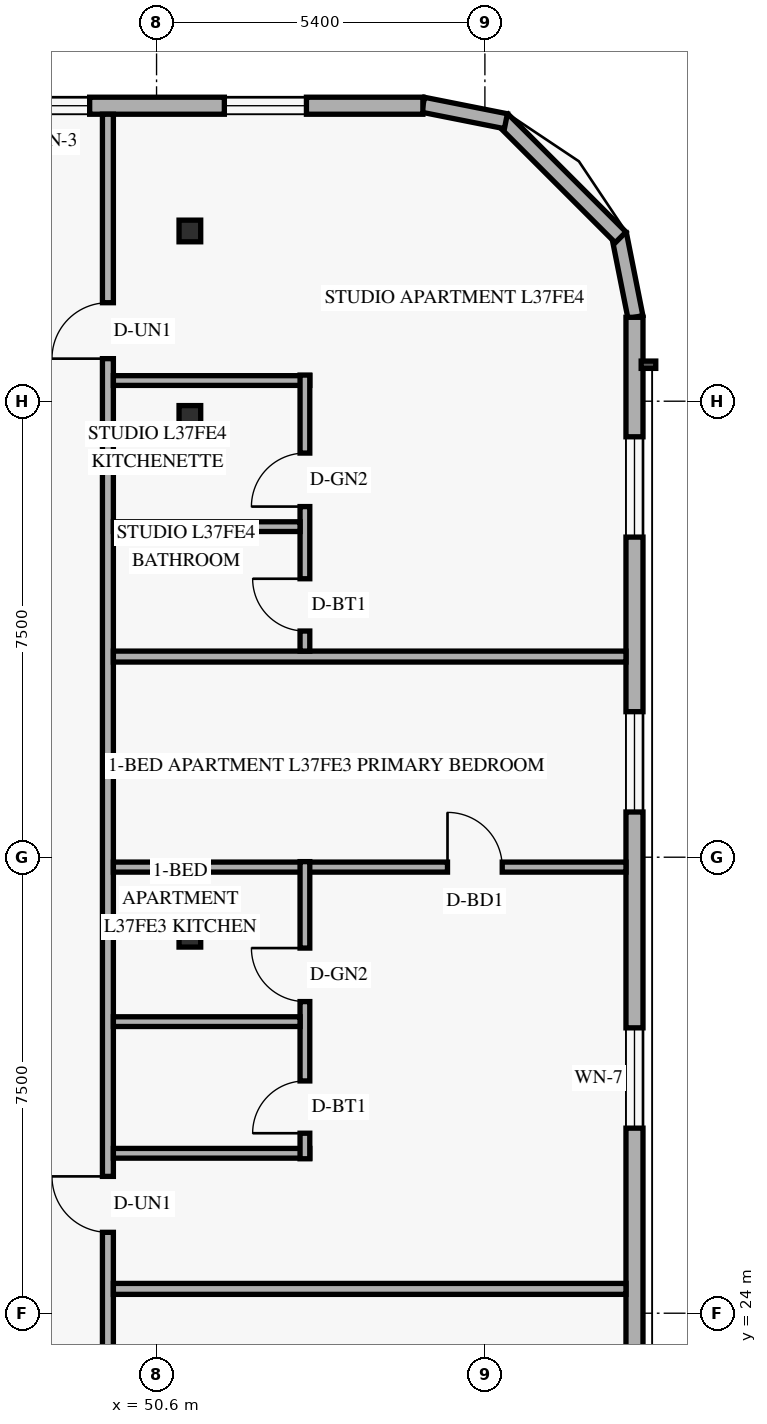
"""IFC4 building model, lengths in metres.
Left out: names, types, materials, properties, quantities, classifications, styles, units other than length and angle.
Written with IfcOpenShell. Run it as: python <this file> out.ifc"""

import sys

from ifc_helpers import new_model, si_unit, direction, frame, frame_2d, origin, origin_2d, place, context, subcontext, project, spatial, rectangle, hollow_rectangle, extrude, element, fill, save


model = new_model("IFC4")
c1 = context("Model", 3, precision=1e-05, world=origin(), true_north=direction((0.0, 1.0)))
c2 = subcontext(c1, "Body", "Model", "MODEL_VIEW")
j1 = project(units=[si_unit("LENGTHUNIT", "METRE"), si_unit("PLANEANGLEUNIT", "RADIAN")], contexts=[c1])
p1 = place(None, origin())
s1 = spatial("IfcSite", under=j1, at=p1, CompositionType="ELEMENT")
p2 = place(p1, origin())
s2 = spatial("IfcBuilding", under=s1, at=p2, CompositionType="ELEMENT")
p3 = place(p2, frame((0.0, 0.0, 144.6)))
s3 = spatial("IfcBuildingStorey", under=s2, at=p3, CompositionType="ELEMENT", Elevation=144.6)
for number, where, z_axis, x_axis in (
    (1, (51.044, 30.2, 0.0), (0.058, 0.0, 0.998), (0.0, 1.0, 0.0)),
    (2, (51.044, 38.75, 0.0), (0.058, 0.0, 0.998), (0.0, 1.0, 0.0)),
    (3, (51.044, 41.8, 0.0), (0.058, 0.0, 0.998), (0.0, 1.0, 0.0)),
):
    element("IfcColumn", number, at=place(p3, frame(where, z_axis=z_axis, x_axis=x_axis)), inside=s3, PredefinedType="COLUMN", context=c2, shape_type="SweptSolid", body=[
        extrude(hollow_rectangle(XDim=0.356, YDim=0.356, WallThickness=0.016, at=origin_2d()), origin(), (0.0, 0.0, 1.0), 3.606),
    ])
p4 = place(p3, frame((58.476, 40.384, 0.0), z_axis=(0.0, 0.0, 1.0), x_axis=(-0.19496651342, 0.980809899341, 0.0)))
e4 = element("IfcWall", 4, at=p4, inside=s3, PredefinedType="SOLIDWALL", context=c2, shape_type="SweptSolid", body=[
    extrude(rectangle(XDim=1.389, YDim=0.25, at=frame_2d((0.694, 0.0))), origin(), (0.0, 0.0, 1.0), 3.36),
])
p5 = place(p3, frame((58.232, 41.695, 0.0), z_axis=(0.0, 0.0, 1.0), x_axis=(-0.707106781187, 0.707106781187, 0.0)))
e5 = element("IfcWall", 5, at=p5, inside=s3, PredefinedType="SOLIDWALL", context=c2, shape_type="SweptSolid", body=[
    extrude(rectangle(XDim=2.739, YDim=0.25, at=frame_2d((1.37, 0.0))), origin(), (0.0, 0.0, 1.0), 3.36),
])
p6 = place(p3, frame((56.345, 43.605, 0.0), z_axis=(0.0, 0.0, 1.0), x_axis=(-0.980809899341, 0.19496651342, 0.0)))
e6 = element("IfcWall", 6, at=p6, inside=s3, PredefinedType="SOLIDWALL", context=c2, shape_type="SweptSolid", body=[
    extrude(rectangle(XDim=1.389, YDim=0.25, at=frame_2d((0.694, 0.0))), origin(), (0.0, 0.0, 1.0), 3.36),
])
p7 = place(p3, frame((58.46, 7.62, 0.0), z_axis=(0.0, 0.0, 1.0), x_axis=(0.0, 1.0, 0.0)))
e7 = element("IfcWall", 7, at=p7, inside=s3, PredefinedType="SOLIDWALL", context=c2, shape_type="SweptSolid", body=[
    extrude(rectangle(XDim=32.76, YDim=0.28, at=frame_2d((16.38, 0.0))), origin(), (0.0, 0.0, 1.0), 3.36),
])
p8 = place(p7, frame((2.165, 0.0, 0.85)))
e8 = element("IfcOpeningElement", 8, at=p8, cuts=e7, PredefinedType="OPENING", context=c2, shape_type="SweptSolid", body=[
    extrude(rectangle(XDim=1.65, YDim=1.6, at=frame_2d((0.825, 0.8))), frame((0.0, 0.15, 0.0), z_axis=(0.0, -1.0, 0.0), x_axis=(1.0, 0.0, 0.0)), (0.0, 0.0, 1.0), 0.3),
])
p9 = place(p7, frame((8.1, 0.0, 0.85)))
e9 = element("IfcOpeningElement", 9, at=p9, cuts=e7, PredefinedType="OPENING", context=c2, shape_type="SweptSolid", body=[
    extrude(rectangle(XDim=1.65, YDim=1.6, at=frame_2d((0.825, 0.8))), frame((0.0, 0.15, 0.0), z_axis=(0.0, -1.0, 0.0), x_axis=(1.0, 0.0, 0.0)), (0.0, 0.0, 1.0), 0.3),
])
p10 = place(p7, frame((13.5, 0.0, 0.85)))
e10 = element("IfcOpeningElement", 10, at=p10, cuts=e7, PredefinedType="OPENING", context=c2, shape_type="SweptSolid", body=[
    extrude(rectangle(XDim=1.65, YDim=1.6, at=frame_2d((0.825, 0.8))), frame((0.0, 0.15, 0.0), z_axis=(0.0, -1.0, 0.0), x_axis=(1.0, 0.0, 0.0)), (0.0, 0.0, 1.0), 0.3),
])
p11 = place(p7, frame((19.424, 0.0, 0.85)))
e11 = element("IfcOpeningElement", 11, at=p11, cuts=e7, PredefinedType="OPENING", context=c2, shape_type="SweptSolid", body=[
    extrude(rectangle(XDim=1.65, YDim=1.6, at=frame_2d((0.825, 0.8))), frame((0.0, 0.15, 0.0), z_axis=(0.0, -1.0, 0.0), x_axis=(1.0, 0.0, 0.0)), (0.0, 0.0, 1.0), 0.3),
])
p12 = place(p7, frame((24.624, 0.0, 0.85)))
e12 = element("IfcOpeningElement", 12, at=p12, cuts=e7, PredefinedType="OPENING", context=c2, shape_type="SweptSolid", body=[
    extrude(rectangle(XDim=1.65, YDim=1.6, at=frame_2d((0.825, 0.8))), frame((0.0, 0.15, 0.0), z_axis=(0.0, -1.0, 0.0), x_axis=(1.0, 0.0, 0.0)), (0.0, 0.0, 1.0), 0.3),
])
p13 = place(p7, frame((29.145, 0.0, 0.85)))
e13 = element("IfcOpeningElement", 13, at=p13, cuts=e7, PredefinedType="OPENING", context=c2, shape_type="SweptSolid", body=[
    extrude(rectangle(XDim=1.65, YDim=1.6, at=frame_2d((0.825, 0.8))), frame((0.0, 0.15, 0.0), z_axis=(0.0, -1.0, 0.0), x_axis=(1.0, 0.0, 0.0)), (0.0, 0.0, 1.0), 0.3),
])
p14 = place(p3, frame((54.98, 43.86, 0.0), z_axis=(0.0, 0.0, 1.0), x_axis=(-1.0, 0.0, 0.0)))
e14 = element("IfcWall", 14, at=p14, inside=s3, PredefinedType="SOLIDWALL", context=c2, shape_type="SweptSolid", body=[
    extrude(rectangle(XDim=33.76, YDim=0.28, at=frame_2d((16.88, 0.0))), origin(), (0.0, 0.0, 1.0), 3.36),
])
p15 = place(p14, frame((28.28, 0.0, 0.85)))
e15 = element("IfcOpeningElement", 15, at=p15, cuts=e14, PredefinedType="OPENING", context=c2, shape_type="SweptSolid", body=[
    extrude(rectangle(XDim=1.35, YDim=1.55, at=frame_2d((0.675, 0.775))), frame((0.0, 0.15, 0.0), z_axis=(0.0, -1.0, 0.0), x_axis=(1.0, 0.0, 0.0)), (0.0, 0.0, 1.0), 0.3),
])
p16 = place(p14, frame((21.395, 0.0, 0.85)))
e16 = element("IfcOpeningElement", 16, at=p16, cuts=e14, PredefinedType="OPENING", context=c2, shape_type="SweptSolid", body=[
    extrude(rectangle(XDim=1.35, YDim=1.55, at=frame_2d((0.675, 0.775))), frame((0.0, 0.15, 0.0), z_axis=(0.0, -1.0, 0.0), x_axis=(1.0, 0.0, 0.0)), (0.0, 0.0, 1.0), 0.3),
])
p17 = place(p14, frame((15.09, 0.0, 0.85)))
e17 = element("IfcOpeningElement", 17, at=p17, cuts=e14, PredefinedType="OPENING", context=c2, shape_type="SweptSolid", body=[
    extrude(rectangle(XDim=1.35, YDim=1.55, at=frame_2d((0.675, 0.775))), frame((0.0, 0.15, 0.0), z_axis=(0.0, -1.0, 0.0), x_axis=(1.0, 0.0, 0.0)), (0.0, 0.0, 1.0), 0.3),
])
p18 = place(p14, frame((8.8, 0.0, 0.85)))
e18 = element("IfcOpeningElement", 18, at=p18, cuts=e14, PredefinedType="OPENING", context=c2, shape_type="SweptSolid", body=[
    extrude(rectangle(XDim=1.35, YDim=1.55, at=frame_2d((0.675, 0.775))), frame((0.0, 0.15, 0.0), z_axis=(0.0, -1.0, 0.0), x_axis=(1.0, 0.0, 0.0)), (0.0, 0.0, 1.0), 0.3),
])
p19 = place(p14, frame((5.48, 0.0, 0.85)))
e19 = element("IfcOpeningElement", 19, at=p19, cuts=e14, PredefinedType="OPENING", context=c2, shape_type="SweptSolid", body=[
    extrude(rectangle(XDim=1.2, YDim=1.5, at=frame_2d((0.6, 0.75))), frame((0.0, 0.15, 0.0), z_axis=(0.0, -1.0, 0.0), x_axis=(1.0, 0.0, 0.0)), (0.0, 0.0, 1.0), 0.3),
])
p20 = place(p14, frame((1.915, 0.0, 0.85)))
e20 = element("IfcOpeningElement", 20, at=p20, cuts=e14, PredefinedType="OPENING", context=c2, shape_type="SweptSolid", body=[
    extrude(rectangle(XDim=1.35, YDim=1.55, at=frame_2d((0.675, 0.775))), frame((0.0, 0.15, 0.0), z_axis=(0.0, -1.0, 0.0), x_axis=(1.0, 0.0, 0.0)), (0.0, 0.0, 1.0), 0.3),
])
p21 = place(p3, frame((49.8, 4.28, 0.0), z_axis=(0.0, 0.0, 1.0), x_axis=(0.0, 1.0, 0.0)))
e21 = element("IfcWall", 21, at=p21, inside=s3, PredefinedType="STANDARD", context=c2, shape_type="SweptSolid", body=[
    extrude(rectangle(XDim=39.44, YDim=0.18, at=frame_2d((19.72, 0.0))), origin(), (0.0, 0.0, 1.0), 2.73),
])
p22 = place(p21, frame((3.38, 0.0, 0.0)))
e22 = element("IfcOpeningElement", 22, at=p22, cuts=e21, PredefinedType="OPENING", context=c2, shape_type="SweptSolid", body=[
    extrude(rectangle(XDim=0.92, YDim=2.15, at=frame_2d((0.46, 1.075))), frame((0.0, 0.1, 0.0), z_axis=(0.0, -1.0, 0.0), x_axis=(1.0, 0.0, 0.0)), (0.0, 0.0, 1.0), 0.2),
])
p23 = place(p21, frame((14.32, 0.0, 0.0)))
e23 = element("IfcOpeningElement", 23, at=p23, cuts=e21, PredefinedType="OPENING", context=c2, shape_type="SweptSolid", body=[
    extrude(rectangle(XDim=0.92, YDim=2.15, at=frame_2d((0.46, 1.075))), frame((0.0, 0.1, 0.0), z_axis=(0.0, -1.0, 0.0), x_axis=(1.0, 0.0, 0.0)), (0.0, 0.0, 1.0), 0.2),
])
p24 = place(p21, frame((21.05, 0.0, 0.0)))
e24 = element("IfcOpeningElement", 24, at=p24, cuts=e21, PredefinedType="OPENING", context=c2, shape_type="SweptSolid", body=[
    extrude(rectangle(XDim=0.92, YDim=2.15, at=frame_2d((0.46, 1.075))), frame((0.0, 0.1, 0.0), z_axis=(0.0, -1.0, 0.0), x_axis=(1.0, 0.0, 0.0)), (0.0, 0.0, 1.0), 0.2),
])
p25 = place(p21, frame((35.42, 0.0, 0.0)))
e25 = element("IfcOpeningElement", 25, at=p25, cuts=e21, PredefinedType="OPENING", context=c2, shape_type="SweptSolid", body=[
    extrude(rectangle(XDim=0.92, YDim=2.15, at=frame_2d((0.46, 1.075))), frame((0.0, 0.1, 0.0), z_axis=(0.0, -1.0, 0.0), x_axis=(1.0, 0.0, 0.0)), (0.0, 0.0, 1.0), 0.2),
])
p26 = place(p3, frame((49.89, 24.4, 0.0), z_axis=(0.0, 0.0, 1.0), x_axis=(1.0, 0.0, 0.0)))
e26 = element("IfcWall", 26, at=p26, inside=s3, PredefinedType="PARTITIONING", context=c2, shape_type="SweptSolid", body=[
    extrude(rectangle(XDim=8.43, YDim=0.18, at=frame_2d((4.215, 0.0))), origin(), (0.0, 0.0, 1.0), 2.879),
])
p27 = place(p3, frame((49.89, 31.337, 0.0), z_axis=(0.0, 0.0, 1.0), x_axis=(1.0, 0.0, 0.0)))
e27 = element("IfcWall", 27, at=p27, inside=s3, PredefinedType="PARTITIONING", context=c2, shape_type="SweptSolid", body=[
    extrude(rectangle(XDim=8.43, YDim=0.165, at=frame_2d((4.215, 0.0))), origin(), (0.0, 0.0, 1.0), 2.879),
])
p28 = place(p27, frame((5.495, 0.0, 0.0)))
e28 = element("IfcOpeningElement", 28, at=p28, cuts=e27, PredefinedType="OPENING", context=c2, shape_type="SweptSolid", body=[
    extrude(rectangle(XDim=0.9, YDim=2.14, at=frame_2d((0.45, 1.07))), frame((0.0, 0.093, 0.0), z_axis=(0.0, -1.0, 0.0), x_axis=(1.0, 0.0, 0.0)), (0.0, 0.0, 1.0), 0.185),
])
p29 = place(p3, frame((49.89, 26.63, 0.0), z_axis=(0.0, 0.0, 1.0), x_axis=(1.0, 0.0, 0.0)))
e29 = element("IfcWall", 29, at=p29, inside=s3, PredefinedType="PLUMBINGWALL", context=c2, shape_type="SweptSolid", body=[
    extrude(rectangle(XDim=3.23, YDim=0.16, at=frame_2d((1.615, 0.0))), origin(), (0.0, 0.0, 1.0), 2.879),
])
p30 = place(p3, frame((53.04, 26.54, 0.0), z_axis=(0.0, 0.0, 1.0), x_axis=(0.0, 1.0, 0.0)))
e30 = element("IfcWall", 30, at=p30, inside=s3, PredefinedType="PLUMBINGWALL", context=c2, shape_type="SweptSolid", body=[
    extrude(rectangle(XDim=4.887, YDim=0.16, at=frame_2d((2.444, 0.0))), origin(), (0.0, 0.0, 1.0), 3.36),
])
p31 = place(p30, frame((0.42, 0.0, 0.0)))
e31 = element("IfcOpeningElement", 31, at=p31, cuts=e30, PredefinedType="OPENING", context=c2, shape_type="SweptSolid", body=[
    extrude(rectangle(XDim=0.86, YDim=2.12, at=frame_2d((0.43, 1.06))), frame((0.0, 0.09, 0.0), z_axis=(0.0, -1.0, 0.0), x_axis=(1.0, 0.0, 0.0)), (0.0, 0.0, 1.0), 0.18),
])
p32 = place(p30, frame((2.585, 0.0, 0.0)))
e32 = element("IfcOpeningElement", 32, at=p32, cuts=e30, PredefinedType="OPENING", context=c2, shape_type="SweptSolid", body=[
    extrude(rectangle(XDim=0.88, YDim=2.12, at=frame_2d((0.44, 1.06))), frame((0.0, 0.09, 0.0), z_axis=(0.0, -1.0, 0.0), x_axis=(1.0, 0.0, 0.0)), (0.0, 0.0, 1.0), 0.18),
])
p33 = place(p3, frame((49.89, 28.796, 0.0), z_axis=(0.0, 0.0, 1.0), x_axis=(1.0, 0.0, 0.0)))
e33 = element("IfcWall", 33, at=p33, inside=s3, PredefinedType="PLUMBINGWALL", context=c2, shape_type="SweptSolid", body=[
    extrude(rectangle(XDim=3.07, YDim=0.16, at=frame_2d((1.535, 0.0))), origin(), (0.0, 0.0, 1.0), 2.879),
])
p34 = place(p3, frame((49.89, 34.8, 0.0), z_axis=(0.0, 0.0, 1.0), x_axis=(1.0, 0.0, 0.0)))
e34 = element("IfcWall", 34, at=p34, inside=s3, PredefinedType="PARTITIONING", context=c2, shape_type="SweptSolid", body=[
    extrude(rectangle(XDim=8.43, YDim=0.18, at=frame_2d((4.215, 0.0))), origin(), (0.0, 0.0, 1.0), 2.879),
])
p35 = place(p3, frame((49.89, 39.34, 0.0), z_axis=(0.0, 0.0, 1.0), x_axis=(1.0, 0.0, 0.0)))
e35 = element("IfcWall", 35, at=p35, inside=s3, PredefinedType="PLUMBINGWALL", context=c2, shape_type="SweptSolid", body=[
    extrude(rectangle(XDim=3.23, YDim=0.16, at=frame_2d((1.615, 0.0))), origin(), (0.0, 0.0, 1.0), 2.879),
])
p36 = place(p3, frame((53.04, 34.89, 0.0), z_axis=(0.0, 0.0, 1.0), x_axis=(0.0, 1.0, 0.0)))
e36 = element("IfcWall", 36, at=p36, inside=s3, PredefinedType="PLUMBINGWALL", context=c2, shape_type="SweptSolid", body=[
    extrude(rectangle(XDim=4.54, YDim=0.16, at=frame_2d((2.27, 0.0))), origin(), (0.0, 0.0, 1.0), 3.36),
])
p37 = place(p36, frame((0.33, 0.0, 0.0)))
e37 = element("IfcOpeningElement", 37, at=p37, cuts=e36, PredefinedType="OPENING", context=c2, shape_type="SweptSolid", body=[
    extrude(rectangle(XDim=0.86, YDim=2.12, at=frame_2d((0.43, 1.06))), frame((0.0, 0.09, 0.0), z_axis=(0.0, -1.0, 0.0), x_axis=(1.0, 0.0, 0.0)), (0.0, 0.0, 1.0), 0.18),
])
p38 = place(p36, frame((2.377, 0.0, 0.0)))
e38 = element("IfcOpeningElement", 38, at=p38, cuts=e36, PredefinedType="OPENING", context=c2, shape_type="SweptSolid", body=[
    extrude(rectangle(XDim=0.88, YDim=2.12, at=frame_2d((0.44, 1.06))), frame((0.0, 0.09, 0.0), z_axis=(0.0, -1.0, 0.0), x_axis=(1.0, 0.0, 0.0)), (0.0, 0.0, 1.0), 0.18),
])
p39 = place(p3, frame((49.89, 36.937, 0.0), z_axis=(0.0, 0.0, 1.0), x_axis=(1.0, 0.0, 0.0)))
e39 = element("IfcWall", 39, at=p39, inside=s3, PredefinedType="PLUMBINGWALL", context=c2, shape_type="SweptSolid", body=[
    extrude(rectangle(XDim=3.07, YDim=0.16, at=frame_2d((1.535, 0.0))), origin(), (0.0, 0.0, 1.0), 2.879),
])
p40 = place(p11, origin())
e40 = element("IfcWindow", 40, at=p40, inside=s3, PartitioningType="SINGLE_PANEL", PredefinedType="WINDOW", context=c2, shape_type="SweptSolid", body=[
    extrude(rectangle(XDim=1.65, YDim=1.6, at=frame_2d((0.825, 0.8))), frame((0.0, 0.03, 0.0), z_axis=(0.0, -1.0, 0.0), x_axis=(1.0, 0.0, 0.0)), (0.0, 0.0, 1.0), 0.06),
])
fill(e11, e40)
p41 = place(p12, origin())
e41 = element("IfcWindow", 41, at=p41, inside=s3, PartitioningType="SINGLE_PANEL", PredefinedType="WINDOW", context=c2, shape_type="SweptSolid", body=[
    extrude(rectangle(XDim=1.65, YDim=1.6, at=frame_2d((0.825, 0.8))), frame((0.0, 0.03, 0.0), z_axis=(0.0, -1.0, 0.0), x_axis=(1.0, 0.0, 0.0)), (0.0, 0.0, 1.0), 0.06),
])
fill(e12, e41)
p42 = place(p13, origin())
e42 = element("IfcWindow", 42, at=p42, inside=s3, PartitioningType="SINGLE_PANEL", PredefinedType="WINDOW", context=c2, shape_type="SweptSolid", body=[
    extrude(rectangle(XDim=1.65, YDim=1.6, at=frame_2d((0.825, 0.8))), frame((0.0, 0.03, 0.0), z_axis=(0.0, -1.0, 0.0), x_axis=(1.0, 0.0, 0.0)), (0.0, 0.0, 1.0), 0.06),
])
fill(e13, e42)
p43 = place(p19, origin())
e43 = element("IfcWindow", 43, at=p43, inside=s3, PartitioningType="SINGLE_PANEL", PredefinedType="WINDOW", context=c2, shape_type="SweptSolid", body=[
    extrude(rectangle(XDim=1.2, YDim=1.5, at=frame_2d((0.6, 0.75))), frame((0.0, 0.03, 0.0), z_axis=(0.0, -1.0, 0.0), x_axis=(1.0, 0.0, 0.0)), (0.0, 0.0, 1.0), 0.06),
])
fill(e19, e43)
p44 = place(p20, origin())
e44 = element("IfcWindow", 44, at=p44, inside=s3, PartitioningType="SINGLE_PANEL", PredefinedType="WINDOW", context=c2, shape_type="SweptSolid", body=[
    extrude(rectangle(XDim=1.35, YDim=1.55, at=frame_2d((0.675, 0.775))), frame((0.0, 0.03, 0.0), z_axis=(0.0, -1.0, 0.0), x_axis=(1.0, 0.0, 0.0)), (0.0, 0.0, 1.0), 0.06),
])
fill(e20, e44)
p45 = place(p24, origin())
e45 = element("IfcDoor", 45, at=p45, inside=s3, OperationType="SINGLE_SWING_RIGHT", PredefinedType="DOOR", context=c2, shape_type="SweptSolid", body=[
    extrude(rectangle(XDim=0.92, YDim=2.15, at=frame_2d((0.46, 1.075))), frame((0.0, 0.025, 0.0), z_axis=(0.0, -1.0, 0.0), x_axis=(1.0, 0.0, 0.0)), (0.0, 0.0, 1.0), 0.05),
])
fill(e24, e45)
p46 = place(p31, origin())
e46 = element("IfcDoor", 46, at=p46, inside=s3, OperationType="SINGLE_SWING_LEFT", PredefinedType="DOOR", context=c2, shape_type="SweptSolid", body=[
    extrude(rectangle(XDim=0.86, YDim=2.12, at=frame_2d((0.43, 1.06))), frame((0.0, 0.025, 0.0), z_axis=(0.0, -1.0, 0.0), x_axis=(1.0, 0.0, 0.0)), (0.0, 0.0, 1.0), 0.05),
])
fill(e31, e46)
p47 = place(p32, origin())
e47 = element("IfcDoor", 47, at=p47, inside=s3, OperationType="SINGLE_SWING_RIGHT", PredefinedType="DOOR", context=c2, shape_type="SweptSolid", body=[
    extrude(rectangle(XDim=0.88, YDim=2.12, at=frame_2d((0.44, 1.06))), frame((0.0, 0.025, 0.0), z_axis=(0.0, -1.0, 0.0), x_axis=(1.0, 0.0, 0.0)), (0.0, 0.0, 1.0), 0.05),
])
fill(e32, e47)
p48 = place(p28, origin())
e48 = element("IfcDoor", 48, at=p48, inside=s3, OperationType="SINGLE_SWING_LEFT", PredefinedType="DOOR", context=c2, shape_type="SweptSolid", body=[
    extrude(rectangle(XDim=0.9, YDim=2.14, at=frame_2d((0.45, 1.07))), frame((0.0, 0.025, 0.0), z_axis=(0.0, -1.0, 0.0), x_axis=(1.0, 0.0, 0.0)), (0.0, 0.0, 1.0), 0.05),
])
fill(e28, e48)
p49 = place(p25, origin())
e49 = element("IfcDoor", 49, at=p49, inside=s3, OperationType="SINGLE_SWING_LEFT", PredefinedType="DOOR", context=c2, shape_type="SweptSolid", body=[
    extrude(rectangle(XDim=0.92, YDim=2.15, at=frame_2d((0.46, 1.075))), frame((0.0, 0.025, 0.0), z_axis=(0.0, -1.0, 0.0), x_axis=(1.0, 0.0, 0.0)), (0.0, 0.0, 1.0), 0.05),
])
fill(e25, e49)
p50 = place(p37, origin())
e50 = element("IfcDoor", 50, at=p50, inside=s3, OperationType="SINGLE_SWING_RIGHT", PredefinedType="DOOR", context=c2, shape_type="SweptSolid", body=[
    extrude(rectangle(XDim=0.86, YDim=2.12, at=frame_2d((0.43, 1.06))), frame((0.0, 0.025, 0.0), z_axis=(0.0, -1.0, 0.0), x_axis=(1.0, 0.0, 0.0)), (0.0, 0.0, 1.0), 0.05),
])
fill(e37, e50)
p51 = place(p38, origin())
e51 = element("IfcDoor", 51, at=p51, inside=s3, OperationType="SINGLE_SWING_LEFT", PredefinedType="DOOR", context=c2, shape_type="SweptSolid", body=[
    extrude(rectangle(XDim=0.88, YDim=2.12, at=frame_2d((0.44, 1.06))), frame((0.0, 0.025, 0.0), z_axis=(0.0, -1.0, 0.0), x_axis=(1.0, 0.0, 0.0)), (0.0, 0.0, 1.0), 0.05),
])
fill(e38, e51)
save(model, sys.argv[1])
